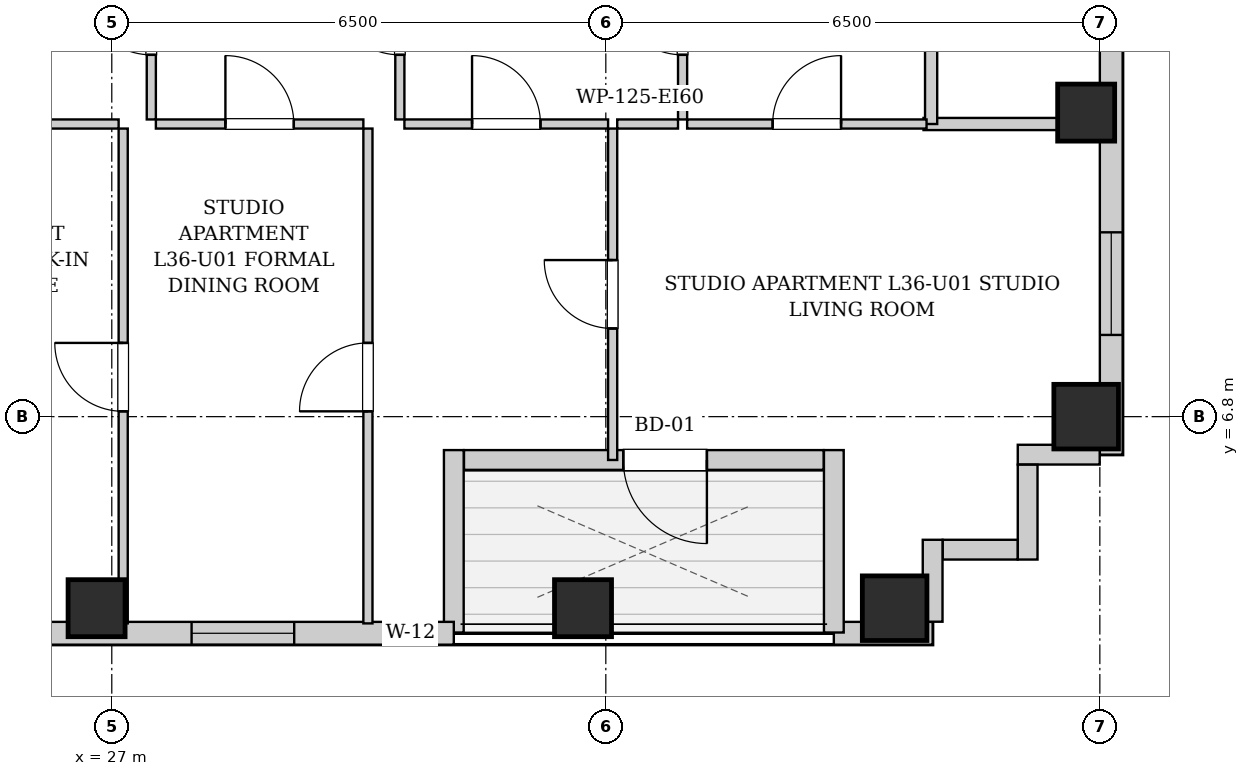
"""IFC4 building model, lengths in metres.
Left out: names, types, materials, properties, quantities, classifications, styles, units other than length and angle.
Written with IfcOpenShell. Run it as: python <this file> out.ifc"""

import sys

from ifc_helpers import new_model, si_unit, direction, frame, frame_2d, origin, origin_2d, place, context, subcontext, project, spatial, rectangle, extrude, element, fill, save


model = new_model("IFC4")
c1 = context("Model", 3, precision=1e-05, world=origin(), true_north=direction((0.0, 1.0)))
c2 = subcontext(c1, "Body", "Model", "MODEL_VIEW")
j1 = project(units=[si_unit("LENGTHUNIT", "METRE"), si_unit("PLANEANGLEUNIT", "RADIAN")], contexts=[c1])
p1 = place(None, origin())
s1 = spatial("IfcSite", under=j1, at=p1, CompositionType="ELEMENT")
p2 = place(p1, origin())
s2 = spatial("IfcBuilding", under=s1, at=p2, CompositionType="ELEMENT")
p3 = place(p2, frame((0.0, 0.0, 127.65)))
s3 = spatial("IfcBuildingStorey", under=s2, at=p3, CompositionType="ELEMENT", Elevation=127.65)
for number, where, z_axis, x_axis in (
    (1, (26.8, 4.28, 0.0), (0.0, 0.0, 1.0), (1.0, 0.0, 0.0)),
    (2, (33.2, 4.28, 0.0), (0.0, 0.0, 1.0), (1.0, 0.0, 0.0)),
):
    element("IfcColumn", number, at=place(p3, frame(where, z_axis=z_axis, x_axis=x_axis)), inside=s3, PredefinedType="COLUMN", context=c2, shape_type="SweptSolid", body=[
        extrude(rectangle(XDim=0.75, YDim=0.75, at=origin_2d()), origin(), (0.0, 0.0, 1.0), 3.25),
    ])
for number, where, z_axis, x_axis in (
    (3, (37.3, 4.28, 0.0), (0.0, 0.0, 1.0), (1.0, 0.0, 0.0)),
    (4, (39.82, 6.8, 0.0), (0.0, 0.0, 1.0), (1.0, 0.0, 0.0)),
):
    element("IfcColumn", number, at=place(p3, frame(where, z_axis=z_axis, x_axis=x_axis)), inside=s3, PredefinedType="COLUMN", context=c2, shape_type="SweptSolid", body=[
        extrude(rectangle(XDim=0.85, YDim=0.85, at=origin_2d()), origin(), (0.0, 0.0, 1.0), 3.25),
    ])
p4 = place(p3, frame((39.82, 10.8, 0.0), z_axis=(0.0, 0.0, 1.0), x_axis=(1.0, 0.0, 0.0)))
e5 = element("IfcColumn", 5, at=p4, inside=s3, PredefinedType="COLUMN", context=c2, shape_type="SweptSolid", body=[
    extrude(rectangle(XDim=0.75, YDim=0.75, at=origin_2d()), origin(), (0.0, 0.0, 1.0), 3.25),
])
p5 = place(p3, frame((40.15, 40.8, 0.0), z_axis=(0.0, 0.0, 1.0), x_axis=(0.0, -1.0, 0.0)))
e6 = element("IfcWall", 6, at=p5, inside=s3, PredefinedType="SOLIDWALL", context=c2, shape_type="SweptSolid", body=[
    extrude(rectangle(XDim=34.5, YDim=0.3, at=frame_2d((17.25, 0.0))), origin(), (0.0, 0.0, 1.0), 2.99),
])
p6 = place(p5, frame((31.575, 0.0, 0.55)))
e7 = element("IfcOpeningElement", 7, at=p6, cuts=e6, PredefinedType="OPENING", context=c2, shape_type="SweptSolid", body=[
    extrude(rectangle(XDim=1.35, YDim=1.2, at=frame_2d((0.675, 0.6))), frame((0.0, 0.16, 0.0), z_axis=(0.0, -1.0, 0.0), x_axis=(1.0, 0.0, 0.0)), (0.0, 0.0, 1.0), 0.32),
])
p7 = place(p5, frame((3.075, 0.0, 0.55)))
e8 = element("IfcOpeningElement", 8, at=p7, cuts=e6, PredefinedType="OPENING", context=c2, shape_type="SweptSolid", body=[
    extrude(rectangle(XDim=1.35, YDim=1.2, at=frame_2d((0.675, 0.6))), frame((0.0, 0.16, 0.0), z_axis=(0.0, -1.0, 0.0), x_axis=(1.0, 0.0, 0.0)), (0.0, 0.0, 1.0), 0.32),
])
p8 = place(p5, frame((1.085, 0.0, 0.55)))
e9 = element("IfcOpeningElement", 9, at=p8, cuts=e6, PredefinedType="OPENING", context=c2, shape_type="SweptSolid", body=[
    extrude(rectangle(XDim=1.35, YDim=1.2, at=frame_2d((0.675, 0.6))), frame((0.0, 0.16, 0.0), z_axis=(0.0, -1.0, 0.0), x_axis=(1.0, 0.0, 0.0)), (0.0, 0.0, 1.0), 0.32),
])
p9 = place(p5, frame((22.8, 0.0, 0.55)))
e10 = element("IfcOpeningElement", 10, at=p9, cuts=e6, PredefinedType="OPENING", context=c2, shape_type="SweptSolid", body=[
    extrude(rectangle(XDim=1.35, YDim=1.2, at=frame_2d((0.675, 0.6))), frame((0.0, 0.16, 0.0), z_axis=(0.0, -1.0, 0.0), x_axis=(1.0, 0.0, 0.0)), (0.0, 0.0, 1.0), 0.32),
])
p10 = place(p5, frame((13.425, 0.0, 0.55)))
e11 = element("IfcOpeningElement", 11, at=p10, cuts=e6, PredefinedType="OPENING", context=c2, shape_type="SweptSolid", body=[
    extrude(rectangle(XDim=1.35, YDim=1.2, at=frame_2d((0.675, 0.6))), frame((0.0, 0.16, 0.0), z_axis=(0.0, -1.0, 0.0), x_axis=(1.0, 0.0, 0.0)), (0.0, 0.0, 1.0), 0.32),
])
p11 = place(p3, frame((37.8, 3.95, 0.0), z_axis=(0.0, 0.0, 1.0), x_axis=(-1.0, 0.0, 0.0)))
e12 = element("IfcWall", 12, at=p11, inside=s3, PredefinedType="SOLIDWALL", context=c2, shape_type="SweptSolid", body=[
    extrude(rectangle(XDim=1.3, YDim=0.3, at=frame_2d((0.65, 0.0))), origin(), (0.0, 0.0, 1.0), 2.99),
])
p12 = place(p3, frame((36.5, 3.96, 0.0), z_axis=(0.0, 0.0, 1.0), x_axis=(0.0, 1.0, 0.0)))
e13 = element("IfcWall", 13, at=p12, inside=s3, PredefinedType="SOLIDWALL", context=c2, shape_type="SweptSolid", body=[
    extrude(rectangle(XDim=2.4, YDim=0.26, at=frame_2d((1.2, 0.0))), origin(), (0.0, 0.0, 1.0), 2.99),
])
p13 = place(p3, frame((36.366, 6.23, 0.0), z_axis=(0.0, 0.0, 1.0), x_axis=(-1.0, 0.0, 0.0)))
e14 = element("IfcWall", 14, at=p13, inside=s3, PredefinedType="SOLIDWALL", context=c2, shape_type="SweptSolid", body=[
    extrude(rectangle(XDim=4.732, YDim=0.26, at=frame_2d((2.366, 0.0))), origin(), (0.0, 0.0, 1.0), 2.99),
])
p14 = place(p13, frame((1.536, 0.0, 0.0)))
e15 = element("IfcOpeningElement", 15, at=p14, cuts=e14, PredefinedType="OPENING", context=c2, shape_type="SweptSolid", body=[
    extrude(rectangle(XDim=1.1, YDim=2.0, at=frame_2d((0.55, 1.0))), frame((0.0, 0.14, 0.0), z_axis=(0.0, -1.0, 0.0), x_axis=(1.0, 0.0, 0.0)), (0.0, 0.0, 1.0), 0.28),
])
p15 = place(p3, frame((31.5, 6.36, 0.0), z_axis=(0.0, 0.0, 1.0), x_axis=(0.0, -1.0, 0.0)))
e16 = element("IfcWall", 16, at=p15, inside=s3, PredefinedType="SOLIDWALL", context=c2, shape_type="SweptSolid", body=[
    extrude(rectangle(XDim=2.4, YDim=0.26, at=frame_2d((1.2, 0.0))), origin(), (0.0, 0.0, 1.0), 2.99),
])
p16 = place(p3, frame((31.5, 3.95, 0.0), z_axis=(0.0, 0.0, 1.0), x_axis=(-1.0, 0.0, 0.0)))
e17 = element("IfcWall", 17, at=p16, inside=s3, PredefinedType="SOLIDWALL", context=c2, shape_type="SweptSolid", body=[
    extrude(rectangle(XDim=15.6, YDim=0.3, at=frame_2d((7.8, 0.0))), origin(), (0.0, 0.0, 1.0), 2.99),
])
p17 = place(p16, frame((14.275, 0.0, 0.55)))
e18 = element("IfcOpeningElement", 18, at=p17, cuts=e17, PredefinedType="OPENING", context=c2, shape_type="SweptSolid", body=[
    extrude(rectangle(XDim=0.85, YDim=1.2, at=frame_2d((0.425, 0.6))), frame((0.0, 0.16, 0.0), z_axis=(0.0, -1.0, 0.0), x_axis=(1.0, 0.0, 0.0)), (0.0, 0.0, 1.0), 0.32),
])
p18 = place(p16, frame((11.7, 0.0, 0.55)))
e19 = element("IfcOpeningElement", 19, at=p18, cuts=e17, PredefinedType="OPENING", context=c2, shape_type="SweptSolid", body=[
    extrude(rectangle(XDim=1.35, YDim=1.2, at=frame_2d((0.675, 0.6))), frame((0.0, 0.16, 0.0), z_axis=(0.0, -1.0, 0.0), x_axis=(1.0, 0.0, 0.0)), (0.0, 0.0, 1.0), 0.32),
])
p19 = place(p16, frame((9.0, 0.0, 0.55)))
e20 = element("IfcOpeningElement", 20, at=p19, cuts=e17, PredefinedType="OPENING", context=c2, shape_type="SweptSolid", body=[
    extrude(rectangle(XDim=1.35, YDim=1.2, at=frame_2d((0.675, 0.6))), frame((0.0, 0.16, 0.0), z_axis=(0.0, -1.0, 0.0), x_axis=(1.0, 0.0, 0.0)), (0.0, 0.0, 1.0), 0.32),
])
p20 = place(p16, frame((2.1, 0.0, 0.55)))
e21 = element("IfcOpeningElement", 21, at=p20, cuts=e17, PredefinedType="OPENING", context=c2, shape_type="SweptSolid", body=[
    extrude(rectangle(XDim=1.35, YDim=1.2, at=frame_2d((0.675, 0.6))), frame((0.0, 0.16, 0.0), z_axis=(0.0, -1.0, 0.0), x_axis=(1.0, 0.0, 0.0)), (0.0, 0.0, 1.0), 0.32),
])
p21 = place(p16, frame((0.23, 0.0, 0.55)))
e22 = element("IfcOpeningElement", 22, at=p21, cuts=e17, PredefinedType="OPENING", context=c2, shape_type="SweptSolid", body=[
    extrude(rectangle(XDim=0.68, YDim=1.2, at=frame_2d((0.34, 0.6))), frame((0.0, 0.16, 0.0), z_axis=(0.0, -1.0, 0.0), x_axis=(1.0, 0.0, 0.0)), (0.0, 0.0, 1.0), 0.32),
])
p22 = place(p3, frame((39.998, 6.3, 0.0), z_axis=(0.0, 0.0, 1.0), x_axis=(-1.0, 0.0, 0.0)))
e23 = element("IfcWall", 23, at=p22, inside=s3, PredefinedType="SOLIDWALL", context=c2, shape_type="SweptSolid", body=[
    extrude(rectangle(XDim=1.078, YDim=0.26, at=frame_2d((0.539, 0.0))), origin(), (0.0, 0.0, 1.0), 2.99),
])
p23 = place(p3, frame((39.05, 6.168, 0.0), z_axis=(0.0, 0.0, 1.0), x_axis=(0.0, -1.0, 0.0)))
e24 = element("IfcWall", 24, at=p23, inside=s3, PredefinedType="SOLIDWALL", context=c2, shape_type="SweptSolid", body=[
    extrude(rectangle(XDim=1.248, YDim=0.26, at=frame_2d((0.624, 0.0))), origin(), (0.0, 0.0, 1.0), 2.99),
])
p24 = place(p3, frame((38.918, 5.05, 0.0), z_axis=(0.0, 0.0, 1.0), x_axis=(-1.0, 0.0, 0.0)))
e25 = element("IfcWall", 25, at=p24, inside=s3, PredefinedType="SOLIDWALL", context=c2, shape_type="SweptSolid", body=[
    extrude(rectangle(XDim=0.986, YDim=0.26, at=frame_2d((0.493, 0.0))), origin(), (0.0, 0.0, 1.0), 2.99),
])
p25 = place(p3, frame((37.8, 5.18, 0.0), z_axis=(0.0, 0.0, 1.0), x_axis=(0.0, -1.0, 0.0)))
e26 = element("IfcWall", 26, at=p25, inside=s3, PredefinedType="SOLIDWALL", context=c2, shape_type="SweptSolid", body=[
    extrude(rectangle(XDim=1.078, YDim=0.26, at=frame_2d((0.539, 0.0))), origin(), (0.0, 0.0, 1.0), 2.99),
])
p26 = place(p3, frame((37.68, 10.65, 0.0), z_axis=(0.0, 0.0, 1.0), x_axis=(1.0, 0.0, 0.0)))
e27 = element("IfcWall", 27, at=p26, inside=s3, PredefinedType="PARTITIONING", context=c2, shape_type="SweptSolid", body=[
    extrude(rectangle(XDim=2.34, YDim=0.16, at=frame_2d((1.17, 0.0))), origin(), (0.0, 0.0, 1.0), 2.99),
])
p27 = place(p3, frame((37.78, 10.65, 0.0), z_axis=(0.0, 0.0, 1.0), x_axis=(0.0, 1.0, 0.0)))
e28 = element("IfcWall", 28, at=p27, inside=s3, PredefinedType="PARTITIONING", context=c2, shape_type="SweptSolid", body=[
    extrude(rectangle(XDim=2.66, YDim=0.16, at=frame_2d((1.33, 0.0))), origin(), (0.0, 0.0, 1.0), 2.99),
])
p28 = place(p3, frame((27.52, 10.71, 0.0), z_axis=(0.0, 0.0, 1.0), x_axis=(0.0, 1.0, 0.0)))
e29 = element("IfcWall", 29, at=p28, inside=s3, PredefinedType="PARTITIONING", context=c2, shape_type="SweptSolid", body=[
    extrude(rectangle(XDim=2.6, YDim=0.12, at=frame_2d((1.3, 0.0))), origin(), (0.0, 0.0, 1.0), 2.99),
])
p29 = place(p28, frame((0.85, 0.0, 0.0)))
e30 = element("IfcOpeningElement", 30, at=p29, cuts=e29, PredefinedType="OPENING", context=c2, shape_type="SweptSolid", body=[
    extrude(rectangle(XDim=0.9, YDim=2.05, at=frame_2d((0.45, 1.025))), frame((0.0, 0.07, 0.0), z_axis=(0.0, -1.0, 0.0), x_axis=(1.0, 0.0, 0.0)), (0.0, 0.0, 1.0), 0.14),
])
p30 = place(p3, frame((23.99, 10.65, 0.0), z_axis=(0.0, 0.0, 1.0), x_axis=(1.0, 0.0, 0.0)))
e31 = element("IfcWall", 31, at=p30, inside=s3, PredefinedType="PARTITIONING", context=c2, shape_type="SweptSolid", body=[
    extrude(rectangle(XDim=3.1, YDim=0.12, at=frame_2d((1.55, 0.0))), origin(), (0.0, 0.0, 1.0), 2.99),
])
p31 = place(p30, frame((1.1, 0.0, 0.0)))
e32 = element("IfcOpeningElement", 32, at=p31, cuts=e31, PredefinedType="OPENING", context=c2, shape_type="SweptSolid", body=[
    extrude(rectangle(XDim=0.9, YDim=2.05, at=frame_2d((0.45, 1.025))), frame((0.0, 0.07, 0.0), z_axis=(0.0, -1.0, 0.0), x_axis=(1.0, 0.0, 0.0)), (0.0, 0.0, 1.0), 0.14),
])
p32 = place(p3, frame((30.79, 10.71, 0.0), z_axis=(0.0, 0.0, 1.0), x_axis=(0.0, 1.0, 0.0)))
e33 = element("IfcWall", 33, at=p32, inside=s3, PredefinedType="PARTITIONING", context=c2, shape_type="SweptSolid", body=[
    extrude(rectangle(XDim=2.6, YDim=0.12, at=frame_2d((1.3, 0.0))), origin(), (0.0, 0.0, 1.0), 2.99),
])
p33 = place(p32, frame((0.85, 0.0, 0.0)))
e34 = element("IfcOpeningElement", 34, at=p33, cuts=e33, PredefinedType="OPENING", context=c2, shape_type="SweptSolid", body=[
    extrude(rectangle(XDim=0.9, YDim=2.05, at=frame_2d((0.45, 1.025))), frame((0.0, 0.07, 0.0), z_axis=(0.0, -1.0, 0.0), x_axis=(1.0, 0.0, 0.0)), (0.0, 0.0, 1.0), 0.14),
])
p34 = place(p3, frame((27.58, 10.65, 0.0), z_axis=(0.0, 0.0, 1.0), x_axis=(1.0, 0.0, 0.0)))
e35 = element("IfcWall", 35, at=p34, inside=s3, PredefinedType="PARTITIONING", context=c2, shape_type="SweptSolid", body=[
    extrude(rectangle(XDim=2.73, YDim=0.12, at=frame_2d((1.365, 0.0))), origin(), (0.0, 0.0, 1.0), 2.99),
])
p35 = place(p34, frame((0.915, 0.0, 0.0)))
e36 = element("IfcOpeningElement", 36, at=p35, cuts=e35, PredefinedType="OPENING", context=c2, shape_type="SweptSolid", body=[
    extrude(rectangle(XDim=0.9, YDim=2.05, at=frame_2d((0.45, 1.025))), frame((0.0, 0.07, 0.0), z_axis=(0.0, -1.0, 0.0), x_axis=(1.0, 0.0, 0.0)), (0.0, 0.0, 1.0), 0.14),
])
p36 = place(p3, frame((34.51, 10.71, 0.0), z_axis=(0.0, 0.0, 1.0), x_axis=(0.0, 1.0, 0.0)))
e37 = element("IfcWall", 37, at=p36, inside=s3, PredefinedType="PARTITIONING", context=c2, shape_type="SweptSolid", body=[
    extrude(rectangle(XDim=2.6, YDim=0.12, at=frame_2d((1.3, 0.0))), origin(), (0.0, 0.0, 1.0), 2.99),
])
p37 = place(p36, frame((0.85, 0.0, 0.0)))
e38 = element("IfcOpeningElement", 38, at=p37, cuts=e37, PredefinedType="OPENING", context=c2, shape_type="SweptSolid", body=[
    extrude(rectangle(XDim=0.9, YDim=2.05, at=frame_2d((0.45, 1.025))), frame((0.0, 0.07, 0.0), z_axis=(0.0, -1.0, 0.0), x_axis=(1.0, 0.0, 0.0)), (0.0, 0.0, 1.0), 0.14),
])
p38 = place(p3, frame((30.85, 10.65, 0.0), z_axis=(0.0, 0.0, 1.0), x_axis=(1.0, 0.0, 0.0)))
e39 = element("IfcWall", 39, at=p38, inside=s3, PredefinedType="PARTITIONING", context=c2, shape_type="SweptSolid", body=[
    extrude(rectangle(XDim=2.68, YDim=0.12, at=frame_2d((1.34, 0.0))), origin(), (0.0, 0.0, 1.0), 2.99),
])
p39 = place(p38, frame((0.89, 0.0, 0.0)))
e40 = element("IfcOpeningElement", 40, at=p39, cuts=e39, PredefinedType="OPENING", context=c2, shape_type="SweptSolid", body=[
    extrude(rectangle(XDim=0.9, YDim=2.05, at=frame_2d((0.45, 1.025))), frame((0.0, 0.07, 0.0), z_axis=(0.0, -1.0, 0.0), x_axis=(1.0, 0.0, 0.0)), (0.0, 0.0, 1.0), 0.14),
])
p40 = place(p3, frame((33.65, 10.65, 0.0), z_axis=(0.0, 0.0, 1.0), x_axis=(1.0, 0.0, 0.0)))
e41 = element("IfcWall", 41, at=p40, inside=s3, PredefinedType="PARTITIONING", context=c2, shape_type="SweptSolid", body=[
    extrude(rectangle(XDim=0.8, YDim=0.12, at=frame_2d((0.4, 0.0))), origin(), (0.0, 0.0, 1.0), 2.99),
])
p41 = place(p3, frame((34.57, 10.65, 0.0), z_axis=(0.0, 0.0, 1.0), x_axis=(1.0, 0.0, 0.0)))
e42 = element("IfcWall", 42, at=p41, inside=s3, PredefinedType="PARTITIONING", context=c2, shape_type="SweptSolid", body=[
    extrude(rectangle(XDim=3.15, YDim=0.12, at=frame_2d((1.575, 0.0))), origin(), (0.0, 0.0, 1.0), 2.99),
])
p42 = place(p41, frame((1.125, 0.0, 0.0)))
e43 = element("IfcOpeningElement", 43, at=p42, cuts=e42, PredefinedType="OPENING", context=c2, shape_type="SweptSolid", body=[
    extrude(rectangle(XDim=0.9, YDim=2.05, at=frame_2d((0.45, 1.025))), frame((0.0, 0.07, 0.0), z_axis=(0.0, -1.0, 0.0), x_axis=(1.0, 0.0, 0.0)), (0.0, 0.0, 1.0), 0.14),
])
p43 = place(p3, frame((27.15, 4.08, 0.0), z_axis=(0.0, 0.0, 1.0), x_axis=(0.0, 1.0, 0.0)))
e44 = element("IfcWall", 44, at=p43, inside=s3, PredefinedType="PARTITIONING", context=c2, shape_type="SweptSolid", body=[
    extrude(rectangle(XDim=6.51, YDim=0.12, at=frame_2d((3.255, 0.0))), origin(), (0.0, 0.0, 1.0), 2.99),
])
p44 = place(p43, frame((2.79, 0.0, 0.0)))
e45 = element("IfcOpeningElement", 45, at=p44, cuts=e44, PredefinedType="OPENING", context=c2, shape_type="SweptSolid", body=[
    extrude(rectangle(XDim=0.9, YDim=2.05, at=frame_2d((0.45, 1.025))), frame((0.0, 0.07, 0.0), z_axis=(0.0, -1.0, 0.0), x_axis=(1.0, 0.0, 0.0)), (0.0, 0.0, 1.0), 0.14),
])
p45 = place(p3, frame((30.37, 4.08, 0.0), z_axis=(0.0, 0.0, 1.0), x_axis=(0.0, 1.0, 0.0)))
e46 = element("IfcWall", 46, at=p45, inside=s3, PredefinedType="PARTITIONING", context=c2, shape_type="SweptSolid", body=[
    extrude(rectangle(XDim=6.51, YDim=0.12, at=frame_2d((3.255, 0.0))), origin(), (0.0, 0.0, 1.0), 2.99),
])
p46 = place(p45, frame((2.79, 0.0, 0.0)))
e47 = element("IfcOpeningElement", 47, at=p46, cuts=e46, PredefinedType="OPENING", context=c2, shape_type="SweptSolid", body=[
    extrude(rectangle(XDim=0.9, YDim=2.05, at=frame_2d((0.45, 1.025))), frame((0.0, 0.07, 0.0), z_axis=(0.0, -1.0, 0.0), x_axis=(1.0, 0.0, 0.0)), (0.0, 0.0, 1.0), 0.14),
])
p47 = place(p3, frame((33.59, 6.23, 0.0), z_axis=(0.0, 0.0, 1.0), x_axis=(0.0, 1.0, 0.0)))
e48 = element("IfcWall", 48, at=p47, inside=s3, PredefinedType="PARTITIONING", context=c2, shape_type="SweptSolid", body=[
    extrude(rectangle(XDim=4.36, YDim=0.12, at=frame_2d((2.18, 0.0))), origin(), (0.0, 0.0, 1.0), 2.99),
])
p48 = place(p47, frame((1.73, 0.0, 0.0)))
e49 = element("IfcOpeningElement", 49, at=p48, cuts=e48, PredefinedType="OPENING", context=c2, shape_type="SweptSolid", body=[
    extrude(rectangle(XDim=0.9, YDim=2.05, at=frame_2d((0.45, 1.025))), frame((0.0, 0.07, 0.0), z_axis=(0.0, -1.0, 0.0), x_axis=(1.0, 0.0, 0.0)), (0.0, 0.0, 1.0), 0.14),
])
p49 = place(p29, origin())
e50 = element("IfcDoor", 50, at=p49, inside=s3, OperationType="SINGLE_SWING_RIGHT", PredefinedType="DOOR", context=c2, shape_type="SweptSolid", body=[
    extrude(rectangle(XDim=0.9, YDim=2.05, at=frame_2d((0.45, 1.025))), frame((0.0, 0.025, 0.0), z_axis=(0.0, -1.0, 0.0), x_axis=(1.0, 0.0, 0.0)), (0.0, 0.0, 1.0), 0.05),
])
fill(e30, e50)
p50 = place(p33, origin())
e51 = element("IfcDoor", 51, at=p50, inside=s3, OperationType="SINGLE_SWING_RIGHT", PredefinedType="DOOR", context=c2, shape_type="SweptSolid", body=[
    extrude(rectangle(XDim=0.9, YDim=2.05, at=frame_2d((0.45, 1.025))), frame((0.0, 0.025, 0.0), z_axis=(0.0, -1.0, 0.0), x_axis=(1.0, 0.0, 0.0)), (0.0, 0.0, 1.0), 0.05),
])
fill(e34, e51)
p51 = place(p35, origin())
e52 = element("IfcDoor", 52, at=p51, inside=s3, OperationType="SINGLE_SWING_LEFT", PredefinedType="DOOR", context=c2, shape_type="SweptSolid", body=[
    extrude(rectangle(XDim=0.9, YDim=2.05, at=frame_2d((0.45, 1.025))), frame((0.0, 0.025, 0.0), z_axis=(0.0, -1.0, 0.0), x_axis=(1.0, 0.0, 0.0)), (0.0, 0.0, 1.0), 0.05),
])
fill(e36, e52)
p52 = place(p37, origin())
e53 = element("IfcDoor", 53, at=p52, inside=s3, OperationType="SINGLE_SWING_RIGHT", PredefinedType="DOOR", context=c2, shape_type="SweptSolid", body=[
    extrude(rectangle(XDim=0.9, YDim=2.05, at=frame_2d((0.45, 1.025))), frame((0.0, 0.025, 0.0), z_axis=(0.0, -1.0, 0.0), x_axis=(1.0, 0.0, 0.0)), (0.0, 0.0, 1.0), 0.05),
])
fill(e38, e53)
p53 = place(p39, origin())
e54 = element("IfcDoor", 54, at=p53, inside=s3, OperationType="SINGLE_SWING_LEFT", PredefinedType="DOOR", context=c2, shape_type="SweptSolid", body=[
    extrude(rectangle(XDim=0.9, YDim=2.05, at=frame_2d((0.45, 1.025))), frame((0.0, 0.025, 0.0), z_axis=(0.0, -1.0, 0.0), x_axis=(1.0, 0.0, 0.0)), (0.0, 0.0, 1.0), 0.05),
])
fill(e40, e54)
p54 = place(p42, origin())
e55 = element("IfcDoor", 55, at=p54, inside=s3, OperationType="SINGLE_SWING_RIGHT", PredefinedType="DOOR", context=c2, shape_type="SweptSolid", body=[
    extrude(rectangle(XDim=0.9, YDim=2.05, at=frame_2d((0.45, 1.025))), frame((0.0, 0.025, 0.0), z_axis=(0.0, -1.0, 0.0), x_axis=(1.0, 0.0, 0.0)), (0.0, 0.0, 1.0), 0.05),
])
fill(e43, e55)
p55 = place(p44, origin())
e56 = element("IfcDoor", 56, at=p55, inside=s3, OperationType="SINGLE_SWING_RIGHT", PredefinedType="DOOR", context=c2, shape_type="SweptSolid", body=[
    extrude(rectangle(XDim=0.9, YDim=2.05, at=frame_2d((0.45, 1.025))), frame((0.0, 0.025, 0.0), z_axis=(0.0, -1.0, 0.0), x_axis=(1.0, 0.0, 0.0)), (0.0, 0.0, 1.0), 0.05),
])
fill(e45, e56)
p56 = place(p46, origin())
e57 = element("IfcDoor", 57, at=p56, inside=s3, OperationType="SINGLE_SWING_LEFT", PredefinedType="DOOR", context=c2, shape_type="SweptSolid", body=[
    extrude(rectangle(XDim=0.9, YDim=2.05, at=frame_2d((0.45, 1.025))), frame((0.0, 0.025, 0.0), z_axis=(0.0, -1.0, 0.0), x_axis=(1.0, 0.0, 0.0)), (0.0, 0.0, 1.0), 0.05),
])
fill(e47, e57)
p57 = place(p48, origin())
e58 = element("IfcDoor", 58, at=p57, inside=s3, OperationType="SINGLE_SWING_RIGHT", PredefinedType="DOOR", context=c2, shape_type="SweptSolid", body=[
    extrude(rectangle(XDim=0.9, YDim=2.05, at=frame_2d((0.45, 1.025))), frame((0.0, 0.025, 0.0), z_axis=(0.0, -1.0, 0.0), x_axis=(1.0, 0.0, 0.0)), (0.0, 0.0, 1.0), 0.05),
])
fill(e49, e58)
p58 = place(p14, origin())
e59 = element("IfcDoor", 59, at=p58, inside=s3, OperationType="SINGLE_SWING_LEFT", PredefinedType="DOOR", context=c2, shape_type="SweptSolid", body=[
    extrude(rectangle(XDim=1.1, YDim=2.0, at=frame_2d((0.55, 1.0))), frame((0.0, 0.025, 0.0), z_axis=(0.0, -1.0, 0.0), x_axis=(1.0, 0.0, 0.0)), (0.0, 0.0, 1.0), 0.05),
])
fill(e15, e59)
p59 = place(p20, origin())
e60 = element("IfcWindow", 60, at=p59, inside=s3, PartitioningType="SINGLE_PANEL", PredefinedType="WINDOW", context=c2, shape_type="SweptSolid", body=[
    extrude(rectangle(XDim=1.35, YDim=1.2, at=frame_2d((0.675, 0.6))), frame((0.0, 0.03, 0.0), z_axis=(0.0, -1.0, 0.0), x_axis=(1.0, 0.0, 0.0)), (0.0, 0.0, 1.0), 0.06),
])
fill(e21, e60)
p60 = place(p21, origin())
e61 = element("IfcWindow", 61, at=p60, inside=s3, PartitioningType="SINGLE_PANEL", PredefinedType="WINDOW", context=c2, shape_type="SweptSolid", body=[
    extrude(rectangle(XDim=0.68, YDim=1.2, at=frame_2d((0.34, 0.6))), frame((0.0, 0.03, 0.0), z_axis=(0.0, -1.0, 0.0), x_axis=(1.0, 0.0, 0.0)), (0.0, 0.0, 1.0), 0.06),
])
fill(e22, e61)
p61 = place(p6, origin())
e62 = element("IfcWindow", 62, at=p61, inside=s3, PartitioningType="SINGLE_PANEL", PredefinedType="WINDOW", context=c2, shape_type="SweptSolid", body=[
    extrude(rectangle(XDim=1.35, YDim=1.2, at=frame_2d((0.675, 0.6))), frame((0.0, 0.03, 0.0), z_axis=(0.0, -1.0, 0.0), x_axis=(1.0, 0.0, 0.0)), (0.0, 0.0, 1.0), 0.06),
])
fill(e7, e62)
save(model, sys.argv[1])
